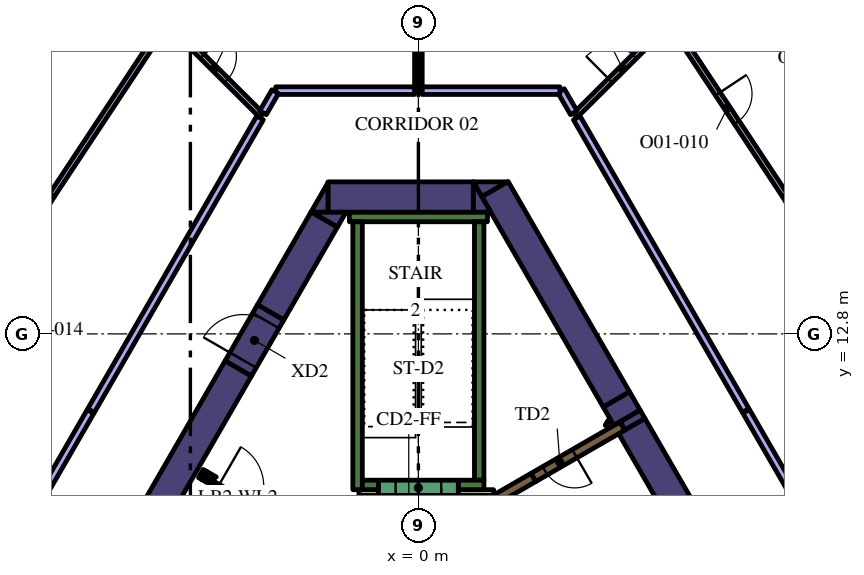
"""IFC4 building model, lengths in metres.
Left out: names, types, materials, properties, quantities, classifications, styles, units other than length and angle.
Written with IfcOpenShell. Run it as: python <this file> out.ifc"""

import sys

from ifc_helpers import new_model, si_unit, direction, frame, frame_2d, origin, place, context, subcontext, project, spatial, polyline, rectangle, outline, extrude, element, fill, save


model = new_model("IFC4")
c1 = context("Model", 3, precision=1e-05, world=origin(), true_north=direction((0.0, 1.0)))
c2 = subcontext(c1, "Body", "Model", "MODEL_VIEW")
j1 = project(units=[si_unit("LENGTHUNIT", "METRE"), si_unit("PLANEANGLEUNIT", "RADIAN")], contexts=[c1])
p1 = place(None, origin())
s1 = spatial("IfcSite", under=j1, at=p1, CompositionType="ELEMENT")
p2 = place(p1, origin())
s2 = spatial("IfcBuilding", under=s1, at=p2, CompositionType="ELEMENT")
p3 = place(p2, frame((0.0, 0.0, 141.6)))
s3 = spatial("IfcBuildingStorey", under=s2, at=p3, CompositionType="ELEMENT", Elevation=141.6)
p4 = place(p3, frame((5.489, 10.594, 0.0), z_axis=(0.0, 0.0, 1.0), x_axis=(-0.500000383388, 0.866025182435, 0.0)))
e1 = element("IfcWall", 1, at=p4, inside=s3, PredefinedType="SOLIDWALL", context=c2, shape_type="SweptSolid", body=[
    extrude(rectangle(XDim=0.558, YDim=0.8, at=frame_2d((0.279, 0.0))), origin(), (0.0, 0.0, 1.0), 4.2),
])
p5 = place(p3, frame((5.615, 10.375, 0.0), z_axis=(0.0, 0.0, 1.0), x_axis=(0.500002746266, -0.866023818221, 0.0)))
e2 = element("IfcWall", 2, at=p5, inside=s3, PredefinedType="SOLIDWALL", context=c2, shape_type="SweptSolid", body=[
    extrude(rectangle(XDim=5.328, YDim=0.8, at=frame_2d((2.664, 0.0))), origin(), (0.0, 0.0, 1.0), 4.2),
])
p6 = place(p3, origin())
e3 = element("IfcWall", 3, at=p6, inside=s3, PredefinedType="SOLIDWALL", context=c2, shape_type="SweptSolid", body=[
    extrude(outline(polyline([(5.432, 10.272), (5.308, 10.487), (5.836, 10.792), (5.96, 10.577), (5.432, 10.272)])), origin(), (0.0, 0.0, 1.0), 4.2),
])
p7 = place(p3, frame((5.209, 11.078, 0.0), z_axis=(0.0, 0.0, 1.0), x_axis=(-0.500035624827, 0.866004834804, 0.0)))
e4 = element("IfcWall", 4, at=p7, inside=s3, PredefinedType="SOLIDWALL", context=c2, shape_type="SweptSolid", body=[
    extrude(rectangle(XDim=6.388, YDim=0.8, at=frame_2d((3.194, 0.0))), origin(), (0.0, 0.0, 1.0), 4.2),
])
e5 = element("IfcWall", 5, at=p6, inside=s3, PredefinedType="SOLIDWALL", context=c2, shape_type="SweptSolid", body=[
    extrude(outline(polyline([(1.443, 16.8), (2.339, 16.8), (1.667, 16.412), (1.443, 16.8)])), origin(), (0.0, 0.0, 1.0), 4.2),
])
p8 = place(p3, frame((-2.379, 16.4, 0.0), z_axis=(0.0, 0.0, 1.0), x_axis=(1.0, 0.0, 0.0)))
e6 = element("IfcWall", 6, at=p8, inside=s3, PredefinedType="SOLIDWALL", context=c2, shape_type="SweptSolid", body=[
    extrude(rectangle(XDim=3.824, YDim=0.8, at=frame_2d((1.912, 0.0))), origin(), (0.0, 0.0, 1.0), 4.2),
])
e7 = element("IfcWall", 7, at=p6, inside=s3, PredefinedType="SOLIDWALL", context=c2, shape_type="SweptSolid", body=[
    extrude(outline(polyline([(1.905, 16.0), (1.447, 16.0), (1.447, 16.793), (1.905, 16.0)])), origin(), (0.0, 0.0, 1.0), 4.2),
])
e8 = element("IfcWall", 8, at=p6, inside=s3, PredefinedType="SOLIDWALL", context=c2, shape_type="SweptSolid", body=[
    extrude(outline(polyline([(-2.829, 16.0), (-2.381, 16.776), (-2.381, 16.0), (-2.829, 16.0)])), origin(), (0.0, 0.0, 1.0), 4.2),
])
p9 = place(p3, frame((-2.477, 15.81, 0.0), z_axis=(0.0, 0.0, 1.0), x_axis=(-0.499969377405, -0.866043083026, 0.0)))
e9 = element("IfcWall", 9, at=p9, inside=s3, PredefinedType="SOLIDWALL", context=c2, shape_type="SweptSolid", body=[
    extrude(rectangle(XDim=2.824, YDim=0.8, at=frame_2d((1.412, 0.0))), origin(), (0.0, 0.0, 1.0), 4.2),
])
e10 = element("IfcWall", 10, at=p6, inside=s3, PredefinedType="SOLIDWALL", context=c2, shape_type="SweptSolid", body=[
    extrude(outline(polyline([(-1.905, 16.0), (-2.129, 15.612), (-2.801, 16.0), (-1.905, 16.0)])), origin(), (0.0, 0.0, 1.0), 4.2),
])
p10 = place(p3, frame((-12.668, -1.842, 0.0), z_axis=(0.0, 0.0, 1.0), x_axis=(0.500003640647, 0.866023301845, 0.0)))
e11 = element("IfcWall", 11, at=p10, inside=s3, PredefinedType="SOLIDWALL", context=c2, shape_type="SweptSolid", body=[
    extrude(rectangle(XDim=15.858, YDim=0.8, at=frame_2d((7.929, 0.0))), origin(), (0.0, 0.0, 1.0), 4.2),
])
p11 = place(p3, frame((-1.817, 15.875, 0.0), z_axis=(0.0, 0.0, 1.0), x_axis=(1.0, 0.0, 0.0)))
e12 = element("IfcWall", 12, at=p11, inside=s3, PredefinedType="SOLIDWALL", context=c2, shape_type="SweptSolid", body=[
    extrude(rectangle(XDim=3.634, YDim=0.25, at=frame_2d((1.817, 0.0))), origin(), (0.0, 0.0, 1.0), 4.2),
])
p12 = place(p3, frame((1.6, 8.95, 0.0), z_axis=(0.0, 0.0, 1.0), x_axis=(0.0, 1.0, 0.0)))
e13 = element("IfcWall", 13, at=p12, inside=s3, PredefinedType="SOLIDWALL", context=c2, shape_type="SweptSolid", body=[
    extrude(rectangle(XDim=6.8, YDim=0.25, at=frame_2d((3.4, 0.0))), origin(), (0.0, 0.0, 1.0), 4.2),
])
p13 = place(p3, frame((1.05, 8.825, 0.0), z_axis=(0.0, 0.0, 1.0), x_axis=(1.0, 0.0, 0.0)))
e14 = element("IfcWall", 14, at=p13, inside=s3, PredefinedType="SOLIDWALL", context=c2, shape_type="SweptSolid", body=[
    extrude(rectangle(XDim=0.675, YDim=0.25, at=frame_2d((0.337, 0.0))), origin(), (0.0, 0.0, 1.0), 4.2),
])
p14 = place(p3, frame((-1.6, 8.7, 0.0), z_axis=(0.0, 0.0, 1.0), x_axis=(0.0, 1.0, 0.0)))
e15 = element("IfcWall", 15, at=p14, inside=s3, PredefinedType="SOLIDWALL", context=c2, shape_type="SweptSolid", body=[
    extrude(rectangle(XDim=7.05, YDim=0.25, at=frame_2d((3.525, 0.0))), origin(), (0.0, 0.0, 1.0), 4.2),
])
p15 = place(p3, frame((-1.475, 8.825, 0.0), z_axis=(0.0, 0.0, 1.0), x_axis=(1.0, 0.0, 0.0)))
e16 = element("IfcWall", 16, at=p15, inside=s3, PredefinedType="SOLIDWALL", context=c2, shape_type="SweptSolid", body=[
    extrude(rectangle(XDim=0.425, YDim=0.25, at=frame_2d((0.212, 0.0))), origin(), (0.0, 0.0, 1.0), 4.2),
])
p16 = place(p3, frame((3.028, 9.023, 0.0), z_axis=(0.0, 0.0, 1.0), x_axis=(-0.866036587186, -0.49998062928, 0.0)))
e17 = element("IfcWall", 17, at=p16, inside=s3, PredefinedType="SOLIDWALL", context=c2, shape_type="SweptSolid", body=[
    extrude(rectangle(XDim=3.384, YDim=0.25, at=frame_2d((1.692, 0.0))), origin(), (0.0, 0.0, 1.0), 4.2),
])
p17 = place(p3, frame((-5.725, 9.125, 0.0), z_axis=(0.0, 0.0, 1.0), x_axis=(0.866185586049, -0.49972245349, 0.0)))
e18 = element("IfcWall", 18, at=p17, inside=s3, PredefinedType="SOLIDWALL", context=c2, shape_type="SweptSolid", body=[
    extrude(rectangle(XDim=0.11, YDim=0.25, at=frame_2d((0.055, 0.0))), origin(), (0.0, 0.0, 1.0), 4.2),
])
e19 = element("IfcWall", 19, at=p6, inside=s3, PredefinedType="SOLIDWALL", context=c2, shape_type="SweptSolid", body=[
    extrude(outline(polyline([(-5.689, 8.96), (-5.69, 8.961), (-5.565, 9.177), (-5.319, 9.035), (-5.335, 9.026), (-5.351, 9.015), (-5.366, 9.002), (-5.379, 8.988), (-5.392, 8.972), (-5.402, 8.956), (-5.412, 8.939), (-5.629, 9.064), (-5.629, 9.064), (-5.689, 8.96)])), origin(), (0.0, 0.0, 1.0), 4.2),
])
p18 = place(p3, frame((1.05, 8.625, 0.0), z_axis=(0.0, 0.0, 1.0), x_axis=(1.0, 0.0, 0.0)))
e20 = element("IfcWall", 20, at=p18, inside=s3, PredefinedType="PARTITIONING", context=c2, shape_type="SweptSolid", body=[
    extrude(rectangle(XDim=0.929, YDim=0.15, at=frame_2d((0.464, 0.0))), origin(), (0.0, 0.0, 1.0), 3.15),
])
p19 = place(p3, frame((-1.564, 8.625, 0.0), z_axis=(0.0, 0.0, 1.0), x_axis=(1.0, 0.0, 0.0)))
e21 = element("IfcWall", 21, at=p19, inside=s3, PredefinedType="PARTITIONING", context=c2, shape_type="SweptSolid", body=[
    extrude(rectangle(XDim=0.514, YDim=0.15, at=frame_2d((0.257, 0.0))), origin(), (0.0, 0.0, 1.0), 3.15),
])
p20 = place(p3, frame((4.98, 10.358, 0.0), z_axis=(0.0, 0.0, 1.0), x_axis=(0.500640202437, 0.86565546709, 0.0)))
e22 = element("IfcWall", 22, at=p20, inside=s3, PredefinedType="PARTITIONING", context=c2, shape_type="SweptSolid", body=[
    extrude(rectangle(XDim=0.146, YDim=0.15, at=frame_2d((0.073, 0.0))), origin(), (0.0, 0.0, 1.0), 3.15),
])
p21 = place(p3, frame((8.565, -2.185, 0.0), z_axis=(0.0, 0.0, 1.0), x_axis=(-0.499997954832, 0.866026584559, 0.0)))
e23 = element("IfcWall", 23, at=p21, inside=s3, PredefinedType="SOLIDWALL", context=c2, shape_type="SweptSolid", body=[
    extrude(rectangle(XDim=12.35, YDim=0.25, at=frame_2d((6.175, 0.0))), origin(), (0.0, 0.0, 1.0), 4.2),
])
p22 = place(p21, frame((0.585, 0.0, 0.0)))
e24 = element("IfcOpeningElement", 24, at=p22, cuts=e23, PredefinedType="OPENING", context=c2, shape_type="SweptSolid", body=[
    extrude(rectangle(XDim=1.1, YDim=2.1, at=frame_2d((0.55, 1.05))), frame((0.0, 0.135, 0.0), z_axis=(0.0, -1.0, 0.0), x_axis=(1.0, 0.0, 0.0)), (0.0, 0.0, 1.0), 0.27),
])
p23 = place(p3, frame((1.05, 8.75, 0.0), z_axis=(0.0, 0.0, 1.0), x_axis=(-1.0, 0.0, 0.0)))
e25 = element("IfcWall", 25, at=p23, inside=s3, PredefinedType="SOLIDWALL", context=c2, shape_type="SweptSolid", body=[
    extrude(rectangle(XDim=2.1, YDim=0.4, at=frame_2d((1.05, 0.0))), origin(), (0.0, 0.0, 1.0), 4.2),
])
p24 = place(p23, frame((0.45, 0.0, 0.0)))
e26 = element("IfcOpeningElement", 26, at=p24, cuts=e25, PredefinedType="OPENING", context=c2, shape_type="SweptSolid", body=[
    extrude(rectangle(XDim=1.2, YDim=2.1, at=frame_2d((0.6, 1.05))), frame((0.0, 0.21, 0.0), z_axis=(0.0, -1.0, 0.0), x_axis=(1.0, 0.0, 0.0)), (0.0, 0.0, 1.0), 0.42),
])
p25 = place(p3, frame((5.366, 10.373, 0.0), z_axis=(0.0, 0.0, 1.0), x_axis=(-0.866019956843, -0.50000943426, 0.0)))
e27 = element("IfcWall", 27, at=p25, inside=s3, PredefinedType="SOLIDWALL", context=c2, shape_type="SweptSolid", body=[
    extrude(rectangle(XDim=2.7, YDim=0.25, at=frame_2d((1.35, 0.0))), origin(), (0.0, 0.0, 1.0), 4.2),
])
p26 = place(p25, frame((1.45, 0.0, 0.0)))
e28 = element("IfcOpeningElement", 28, at=p26, cuts=e27, PredefinedType="OPENING", context=c2, shape_type="SweptSolid", body=[
    extrude(rectangle(XDim=0.9, YDim=2.1, at=frame_2d((0.45, 1.05))), frame((0.0, 0.135, 0.0), z_axis=(0.0, -1.0, 0.0), x_axis=(1.0, 0.0, 0.0)), (0.0, 0.0, 1.0), 0.27),
])
p27 = place(p3, frame((-5.659, 9.012, 0.0), z_axis=(0.0, 0.0, 1.0), x_axis=(0.866009402589, -0.500027713859, 0.0)))
e29 = element("IfcWall", 29, at=p27, inside=s3, PredefinedType="PARTITIONING", context=c2, shape_type="SweptSolid", body=[
    extrude(rectangle(XDim=2.1, YDim=0.12, at=frame_2d((1.05, 0.0))), origin(), (0.0, 0.0, 1.0), 3.15),
])
p28 = place(p27, frame((0.45, 0.0, 0.0)))
e30 = element("IfcOpeningElement", 30, at=p28, cuts=e29, PredefinedType="OPENING", context=c2, shape_type="SweptSolid", body=[
    extrude(rectangle(XDim=1.2, YDim=2.1, at=frame_2d((0.6, 1.05))), frame((0.0, 0.07, 0.0), z_axis=(0.0, -1.0, 0.0), x_axis=(1.0, 0.0, 0.0)), (0.0, 0.0, 1.0), 0.14),
])
p29 = place(p3, frame((-4.739, 11.892, 0.0), z_axis=(0.0, 0.0, 1.0), x_axis=(0.500062241894, 0.865989465428, 0.0)))
e31 = element("IfcWall", 31, at=p29, inside=s3, PredefinedType="SOLIDWALL", context=c2, shape_type="SweptSolid", body=[
    extrude(rectangle(XDim=1.7, YDim=0.8, at=frame_2d((0.85, 0.0))), origin(), (0.0, 0.0, 1.0), 4.2),
])
p30 = place(p29, frame((0.25, 0.0, 0.0)))
e32 = element("IfcOpeningElement", 32, at=p30, cuts=e31, PredefinedType="OPENING", context=c2, shape_type="SweptSolid", body=[
    extrude(rectangle(XDim=1.2, YDim=2.1, at=frame_2d((0.6, 1.05))), frame((0.0, 0.41, 0.0), z_axis=(0.0, -1.0, 0.0), x_axis=(1.0, 0.0, 0.0)), (0.0, 0.0, 1.0), 0.82),
])
p31 = place(p3, frame((11.19, 13.951, 0.0), z_axis=(0.0, 0.0, 1.0), x_axis=(-0.526165616903, 0.850382116221, 0.0)))
e33 = element("IfcWall", 33, at=p31, inside=s3, PredefinedType="PARTITIONING", context=c2, shape_type="SweptSolid", body=[
    extrude(rectangle(XDim=2.935, YDim=0.15, at=frame_2d((1.468, 0.0))), origin(), (0.0, 0.0, 1.0), 3.15),
])
p32 = place(p3, frame((6.616, 21.024, 0.0), z_axis=(0.0, 0.0, 1.0), x_axis=(0.551915124006, -0.833900291338, 0.0)))
e34 = element("IfcWall", 34, at=p32, inside=s3, PredefinedType="PARTITIONING", context=c2, shape_type="SweptSolid", body=[
    extrude(rectangle(XDim=5.488, YDim=0.15, at=frame_2d((2.744, 0.0))), origin(), (0.0, 0.0, 1.0), 3.15),
])
p33 = place(p32, frame((2.288, 0.0, 0.0)))
e35 = element("IfcOpeningElement", 35, at=p33, cuts=e34, PredefinedType="OPENING", context=c2, shape_type="SweptSolid", body=[
    extrude(rectangle(XDim=0.9, YDim=2.1, at=frame_2d((0.45, 1.05))), frame((0.0, 0.085, 0.0), z_axis=(0.0, -1.0, 0.0), x_axis=(1.0, 0.0, 0.0)), (0.0, 0.0, 1.0), 0.17),
])
p34 = place(p3, frame((4.128, 18.55, 0.0), z_axis=(0.0, 0.0, 1.0), x_axis=(0.709237676072, 0.704969445324, 0.0)))
e36 = element("IfcWall", 36, at=p34, inside=s3, PredefinedType="PARTITIONING", context=c2, shape_type="SweptSolid", body=[
    extrude(rectangle(XDim=3.432, YDim=0.15, at=frame_2d((1.716, 0.0))), origin(), (0.0, 0.0, 1.0), 3.15),
])
p35 = place(p34, frame((1.3, 0.0, 0.0)))
e37 = element("IfcOpeningElement", 37, at=p35, cuts=e36, PredefinedType="OPENING", context=c2, shape_type="SweptSolid", body=[
    extrude(rectangle(XDim=0.9, YDim=2.1, at=frame_2d((0.45, 1.05))), frame((0.0, 0.085, 0.0), z_axis=(0.0, -1.0, 0.0), x_axis=(1.0, 0.0, 0.0)), (0.0, 0.0, 1.0), 0.17),
])
p36 = place(p3, frame((13.63, 2.091, 0.0), z_axis=(0.0, 0.0, 1.0), x_axis=(-0.499990634175, 0.866030811078, 0.0)))
e38 = element("IfcWall", 38, at=p36, inside=s3, PredefinedType="PARTITIONING", context=c2, shape_type="SweptSolid", body=[
    extrude(rectangle(XDim=10.008, YDim=0.2, at=frame_2d((5.004, 0.0))), origin(), (0.0, 0.0, 1.0), 3.15),
])
p37 = place(p36, frame((4.5, 0.0, 0.0)))
e39 = element("IfcOpeningElement", 39, at=p37, cuts=e38, PredefinedType="OPENING", context=c2, shape_type="SweptSolid", body=[
    extrude(rectangle(XDim=1.0, YDim=2.1, at=frame_2d((0.5, 1.05))), frame((0.0, 0.11, 0.0), z_axis=(0.0, -1.0, 0.0), x_axis=(1.0, 0.0, 0.0)), (0.0, 0.0, 1.0), 0.22),
])
p38 = place(p3, frame((8.611, 10.785, 0.0), z_axis=(0.0, 0.0, 1.0), x_axis=(-0.499987928593, 0.866032373102, 0.0)))
e40 = element("IfcWall", 40, at=p38, inside=s3, PredefinedType="PARTITIONING", context=c2, shape_type="SweptSolid", body=[
    extrude(rectangle(XDim=8.889, YDim=0.2, at=frame_2d((4.445, 0.0))), origin(), (0.0, 0.0, 1.0), 3.15),
])
p39 = place(p3, frame((0.0, 19.2, 0.0), z_axis=(0.0, 0.0, 1.0), x_axis=(0.0, 1.0, 0.0)))
e41 = element("IfcWall", 41, at=p39, inside=s3, PredefinedType="PARTITIONING", context=c2, shape_type="SweptSolid", body=[
    extrude(rectangle(XDim=10.154, YDim=0.2, at=frame_2d((5.077, 0.0))), origin(), (0.0, 0.0, 1.0), 3.15),
])
p40 = place(p3, frame((4.089, 18.617, 0.0), z_axis=(0.0, 0.0, 1.0), x_axis=(-0.500120377296, 0.865955892764, 0.0)))
e42 = element("IfcWall", 42, at=p40, inside=s3, PredefinedType="PARTITIONING", context=c2, shape_type="SweptSolid", body=[
    extrude(rectangle(XDim=0.673, YDim=0.2, at=frame_2d((0.336, 0.0))), origin(), (0.0, 0.0, 1.0), 3.15),
])
p41 = place(p3, frame((3.723, 19.2, 0.0), z_axis=(0.0, 0.0, 1.0), x_axis=(-1.0, 0.0, 0.0)))
e43 = element("IfcWall", 43, at=p41, inside=s3, PredefinedType="PARTITIONING", context=c2, shape_type="SweptSolid", body=[
    extrude(rectangle(XDim=3.623, YDim=0.2, at=frame_2d((1.812, 0.0))), origin(), (0.0, 0.0, 1.0), 3.15),
])
p42 = place(p3, frame((-6.619, 21.027, 0.0), z_axis=(0.0, 0.0, 1.0), x_axis=(0.709188943058, -0.705018470002, 0.0)))
e44 = element("IfcWall", 44, at=p42, inside=s3, PredefinedType="PARTITIONING", context=c2, shape_type="SweptSolid", body=[
    extrude(rectangle(XDim=3.512, YDim=0.15, at=frame_2d((1.756, 0.0))), origin(), (0.0, 0.0, 1.0), 3.15),
])
p43 = place(p42, frame((1.312, 0.0, 0.0)))
e45 = element("IfcOpeningElement", 45, at=p43, cuts=e44, PredefinedType="OPENING", context=c2, shape_type="SweptSolid", body=[
    extrude(rectangle(XDim=0.9, YDim=2.1, at=frame_2d((0.45, 1.05))), frame((0.0, 0.085, 0.0), z_axis=(0.0, -1.0, 0.0), x_axis=(1.0, 0.0, 0.0)), (0.0, 0.0, 1.0), 0.17),
])
p44 = place(p3, frame((-0.1, 19.2, 0.0), z_axis=(0.0, 0.0, 1.0), x_axis=(-1.0, 0.0, 0.0)))
e46 = element("IfcWall", 46, at=p44, inside=s3, PredefinedType="PARTITIONING", context=c2, shape_type="SweptSolid", body=[
    extrude(rectangle(XDim=3.653, YDim=0.2, at=frame_2d((1.826, 0.0))), origin(), (0.0, 0.0, 1.0), 3.15),
])
p45 = place(p3, frame((-3.768, 19.174, 0.0), z_axis=(0.0, 0.0, 1.0), x_axis=(-0.499897828833, -0.8660843843, 0.0)))
e47 = element("IfcWall", 47, at=p45, inside=s3, PredefinedType="PARTITIONING", context=c2, shape_type="SweptSolid", body=[
    extrude(rectangle(XDim=0.643, YDim=0.2, at=frame_2d((0.321, 0.0))), origin(), (0.0, 0.0, 1.0), 3.15),
])
p46 = place(p3, frame((-6.658, 20.96, 0.0), z_axis=(0.0, 0.0, 1.0), x_axis=(-0.551907039463, -0.833905642019, 0.0)))
e48 = element("IfcWall", 48, at=p46, inside=s3, PredefinedType="PARTITIONING", context=c2, shape_type="SweptSolid", body=[
    extrude(rectangle(XDim=5.412, YDim=0.15, at=frame_2d((2.706, 0.0))), origin(), (0.0, 0.0, 1.0), 3.15),
])
p47 = place(p3, frame((-12.877, 11.224, 0.0), z_axis=(0.0, 0.0, 1.0), x_axis=(0.526202711334, 0.850359163286, 0.0)))
e49 = element("IfcWall", 49, at=p47, inside=s3, PredefinedType="PARTITIONING", context=c2, shape_type="SweptSolid", body=[
    extrude(rectangle(XDim=6.142, YDim=0.15, at=frame_2d((3.071, 0.0))), origin(), (0.0, 0.0, 1.0), 3.15),
])
p48 = place(p47, frame((2.642, 0.0, 0.0)))
e50 = element("IfcOpeningElement", 50, at=p48, cuts=e49, PredefinedType="OPENING", context=c2, shape_type="SweptSolid", body=[
    extrude(rectangle(XDim=0.9, YDim=2.1, at=frame_2d((0.45, 1.05))), frame((0.0, 0.085, 0.0), z_axis=(0.0, -1.0, 0.0), x_axis=(1.0, 0.0, 0.0)), (0.0, 0.0, 1.0), 0.17),
])
p49 = place(p3, frame((-8.628, 10.755, 0.0), z_axis=(0.0, 0.0, 1.0), x_axis=(-0.500004234368, -0.866022959057, 0.0)))
e51 = element("IfcWall", 51, at=p49, inside=s3, PredefinedType="PARTITIONING", context=c2, shape_type="SweptSolid", body=[
    extrude(rectangle(XDim=10.0, YDim=0.2, at=frame_2d((5.0, 0.0))), origin(), (0.0, 0.0, 1.0), 3.15),
])
p50 = place(p49, frame((4.5, 0.0, 0.0)))
e52 = element("IfcOpeningElement", 52, at=p50, cuts=e51, PredefinedType="OPENING", context=c2, shape_type="SweptSolid", body=[
    extrude(rectangle(XDim=1.0, YDim=2.1, at=frame_2d((0.5, 1.05))), frame((0.0, 0.11, 0.0), z_axis=(0.0, -1.0, 0.0), x_axis=(1.0, 0.0, 0.0)), (0.0, 0.0, 1.0), 0.22),
])
p51 = place(p3, frame((-4.167, 18.483, 0.0), z_axis=(0.0, 0.0, 1.0), x_axis=(-0.499974340325, -0.866040217898, 0.0)))
e53 = element("IfcWall", 53, at=p51, inside=s3, PredefinedType="PARTITIONING", context=c2, shape_type="SweptSolid", body=[
    extrude(rectangle(XDim=8.894, YDim=0.2, at=frame_2d((4.447, 0.0))), origin(), (0.0, 0.0, 1.0), 3.15),
])
p52 = place(p24, origin())
e54 = element("IfcDoor", 54, at=p52, inside=s3, OperationType="SINGLE_SWING_LEFT", PredefinedType="DOOR", context=c2, shape_type="SweptSolid", body=[
    extrude(rectangle(XDim=1.2, YDim=2.1, at=frame_2d((0.6, 1.05))), frame((0.0, 0.025, 0.0), z_axis=(0.0, -1.0, 0.0), x_axis=(1.0, 0.0, 0.0)), (0.0, 0.0, 1.0), 0.05),
])
fill(e26, e54)
p53 = place(p26, origin())
e55 = element("IfcDoor", 55, at=p53, inside=s3, OperationType="SINGLE_SWING_LEFT", PredefinedType="DOOR", context=c2, shape_type="SweptSolid", body=[
    extrude(rectangle(XDim=0.9, YDim=2.1, at=frame_2d((0.45, 1.05))), frame((0.0, 0.025, 0.0), z_axis=(0.0, -1.0, 0.0), x_axis=(1.0, 0.0, 0.0)), (0.0, 0.0, 1.0), 0.05),
])
fill(e28, e55)
p54 = place(p28, origin())
e56 = element("IfcDoor", 56, at=p54, inside=s3, OperationType="SINGLE_SWING_LEFT", PredefinedType="DOOR", context=c2, shape_type="SweptSolid", body=[
    extrude(rectangle(XDim=1.2, YDim=2.1, at=frame_2d((0.6, 1.05))), frame((0.0, 0.025, 0.0), z_axis=(0.0, -1.0, 0.0), x_axis=(1.0, 0.0, 0.0)), (0.0, 0.0, 1.0), 0.05),
])
fill(e30, e56)
p55 = place(p30, origin())
e57 = element("IfcDoor", 57, at=p55, inside=s3, OperationType="SINGLE_SWING_LEFT", PredefinedType="DOOR", context=c2, shape_type="SweptSolid", body=[
    extrude(rectangle(XDim=1.2, YDim=2.1, at=frame_2d((0.6, 1.05))), frame((0.0, 0.025, 0.0), z_axis=(0.0, -1.0, 0.0), x_axis=(1.0, 0.0, 0.0)), (0.0, 0.0, 1.0), 0.05),
])
fill(e32, e57)
p56 = place(p33, origin())
e58 = element("IfcDoor", 58, at=p56, inside=s3, OperationType="SINGLE_SWING_LEFT", PredefinedType="DOOR", context=c2, shape_type="SweptSolid", body=[
    extrude(rectangle(XDim=0.9, YDim=2.1, at=frame_2d((0.45, 1.05))), frame((0.0, 0.025, 0.0), z_axis=(0.0, -1.0, 0.0), x_axis=(1.0, 0.0, 0.0)), (0.0, 0.0, 1.0), 0.05),
])
fill(e35, e58)
p57 = place(p35, origin())
e59 = element("IfcDoor", 59, at=p57, inside=s3, OperationType="SINGLE_SWING_RIGHT", PredefinedType="DOOR", context=c2, shape_type="SweptSolid", body=[
    extrude(rectangle(XDim=0.9, YDim=2.1, at=frame_2d((0.45, 1.05))), frame((0.0, 0.025, 0.0), z_axis=(0.0, -1.0, 0.0), x_axis=(1.0, 0.0, 0.0)), (0.0, 0.0, 1.0), 0.05),
])
fill(e37, e59)
p58 = place(p43, origin())
e60 = element("IfcDoor", 60, at=p58, inside=s3, OperationType="SINGLE_SWING_RIGHT", PredefinedType="DOOR", context=c2, shape_type="SweptSolid", body=[
    extrude(rectangle(XDim=0.9, YDim=2.1, at=frame_2d((0.45, 1.05))), frame((0.0, 0.025, 0.0), z_axis=(0.0, -1.0, 0.0), x_axis=(1.0, 0.0, 0.0)), (0.0, 0.0, 1.0), 0.05),
])
fill(e45, e60)
save(model, sys.argv[1])
